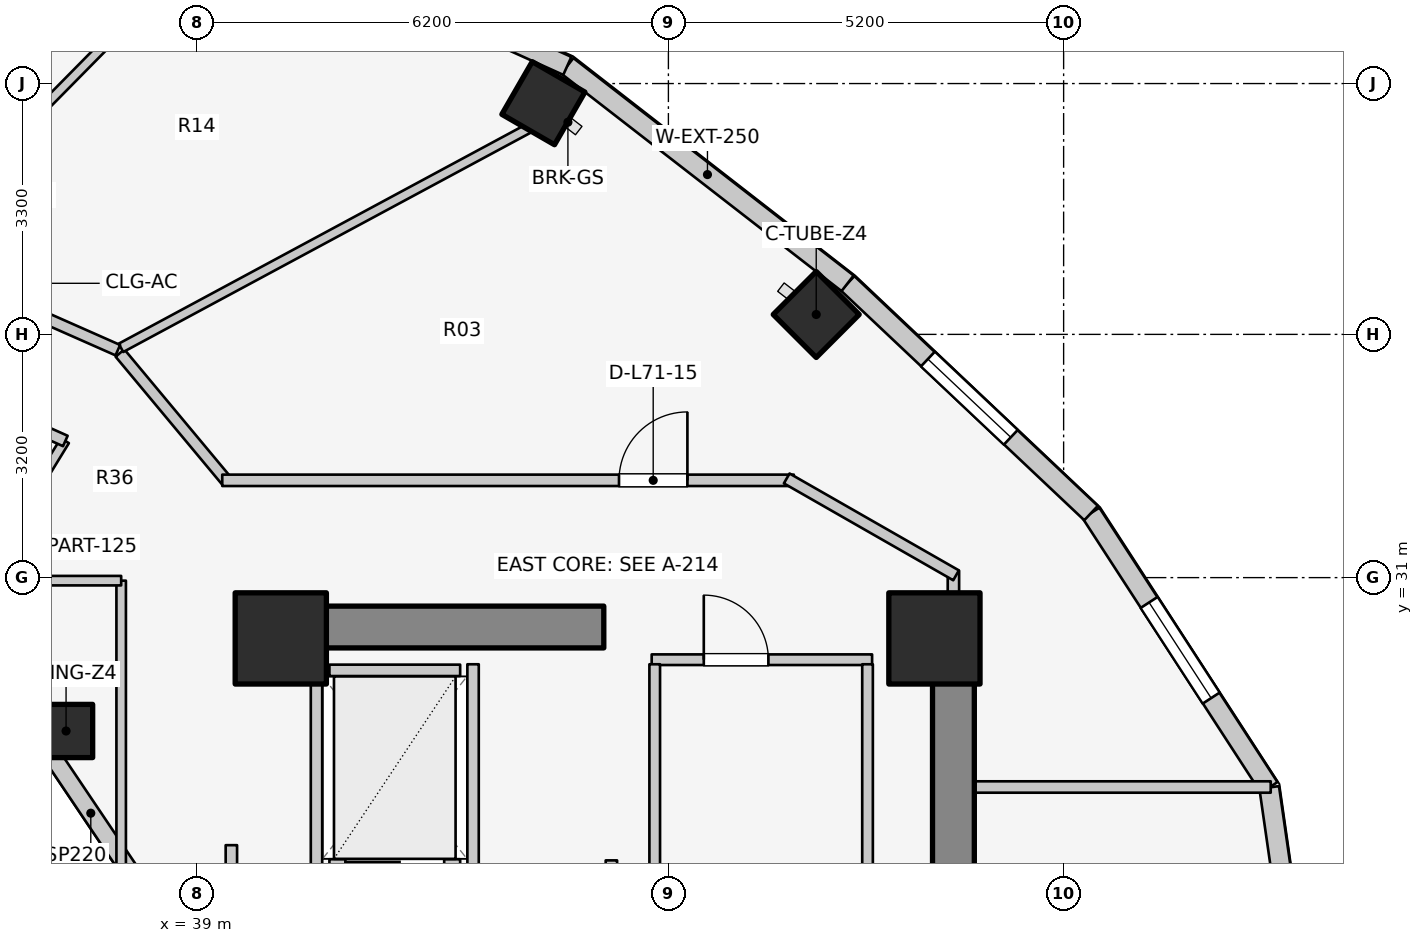
"""IFC4 building model, lengths in metres.
Left out: names, types, materials, properties, quantities, classifications, styles, units other than length and angle.
Written with IfcOpenShell. Run it as: python <this file> out.ifc"""

import sys

from ifc_helpers import new_model, si_unit, direction, frame, frame_2d, origin, origin_2d, place, context, subcontext, project, spatial, rectangle, extrude, element, fill, save


model = new_model("IFC4")
c1 = context("Model", 3, precision=1e-05, world=origin(), true_north=direction((0.0, 1.0)))
c2 = subcontext(c1, "Body", "Model", "MODEL_VIEW")
j1 = project(units=[si_unit("LENGTHUNIT", "METRE"), si_unit("PLANEANGLEUNIT", "RADIAN")], contexts=[c1])
p1 = place(None, origin())
s1 = spatial("IfcSite", under=j1, at=p1, CompositionType="ELEMENT")
p2 = place(p1, origin())
s2 = spatial("IfcBuilding", under=s1, at=p2, CompositionType="ELEMENT")
p3 = place(p2, frame((0.0, 0.0, 232.6)))
s3 = spatial("IfcBuildingStorey", under=s2, at=p3, CompositionType="ELEMENT", Elevation=232.6)
p4 = place(p3, frame((48.95, 17.05, 0.0), z_axis=(0.0, 0.0, 1.0), x_axis=(0.0, 1.0, 0.0)))
e1 = element("IfcWall", 1, at=p4, inside=s3, PredefinedType="SHEAR", context=c2, shape_type="SweptSolid", body=[
    extrude(rectangle(XDim=12.8, YDim=0.55, at=frame_2d((6.4, 0.0))), origin(), (0.0, 0.0, 1.0), 3.1),
])
p5 = place(p3, frame((39.85, 30.35, 0.0), z_axis=(0.0, 0.0, 1.0), x_axis=(1.0, 0.0, 0.0)))
e2 = element("IfcWall", 2, at=p5, inside=s3, PredefinedType="SHEAR", context=c2, shape_type="SweptSolid", body=[
    extrude(rectangle(XDim=4.5, YDim=0.55, at=frame_2d((2.25, 0.0))), origin(), (0.0, 0.0, 1.0), 3.1),
])
for number, where, z_axis, x_axis in (
    (3, (48.7, 30.2, 0.0), (0.0, 0.0, 1.0), (1.0, 0.0, 0.0)),
    (4, (40.1, 30.2, 0.0), (0.0, 0.0, 1.0), (1.0, 0.0, 0.0)),
):
    element("IfcColumn", number, at=place(p3, frame(where, z_axis=z_axis, x_axis=x_axis)), inside=s3, PredefinedType="COLUMN", context=c2, shape_type="SweptSolid", body=[
        extrude(rectangle(XDim=1.2, YDim=1.2, at=origin_2d()), origin(), (0.0, 0.0, 1.0), 3.1),
    ])
p6 = place(p3, frame((37.275, 28.982, 0.0), z_axis=(0.0, 0.0, 1.0), x_axis=(1.0, 0.0, 0.0)))
e5 = element("IfcColumn", 5, at=p6, inside=s3, PredefinedType="COLUMN", context=c2, shape_type="SweptSolid", body=[
    extrude(rectangle(XDim=0.7, YDim=0.7, at=origin_2d()), origin(), (0.0, 0.0, 1.0), 3.1),
])
for number, where, z_axis, x_axis in (
    (6, (47.145, 34.462, 0.0), (0.0, 0.0, 1.0), (0.707, 0.707, 0.0)),
    (7, (43.555, 37.241, 0.0), (0.0, 0.0, 1.0), (0.5, 0.866, 0.0)),
):
    element("IfcColumn", number, at=place(p3, frame(where, z_axis=z_axis, x_axis=x_axis)), inside=s3, PredefinedType="COLUMN", context=c2, shape_type="SweptSolid", body=[
        extrude(rectangle(XDim=0.8, YDim=0.8, at=origin_2d()), origin(), (0.0, 0.0, 1.0), 3.1),
    ])
p7 = place(p3, frame((38.166, 27.06, 0.0), z_axis=(0.0, 0.0, 1.0), x_axis=(-0.558197800898, 0.829707909492, 0.0)))
e8 = element("IfcWall", 8, at=p7, inside=s3, PredefinedType="STANDARD", context=c2, shape_type="SweptSolid", body=[
    extrude(rectangle(XDim=2.027, YDim=0.23, at=frame_2d((1.013, 0.0))), origin(), (0.0, 0.0, 1.0), 2.16),
])
p8 = place(p3, frame((37.035, 28.742, 0.0), z_axis=(0.0, 0.0, 1.0), x_axis=(-0.752576694707, 0.658504607869, 0.0)))
e9 = element("IfcWall", 9, at=p8, inside=s3, PredefinedType="STANDARD", context=c2, shape_type="SweptSolid", body=[
    extrude(rectangle(XDim=1.959, YDim=0.23, at=frame_2d((0.98, 0.0))), origin(), (0.0, 0.0, 1.0), 2.16),
])
p9 = place(p3, frame((53.86, 23.0, 0.0), z_axis=(0.0, 0.0, 1.0), x_axis=(-0.142712754019, 0.989764148593, 0.0)))
e10 = element("IfcWall", 10, at=p9, inside=s3, PredefinedType="STANDARD", context=c2, shape_type="SweptSolid", body=[
    extrude(rectangle(XDim=5.293, YDim=0.26, at=frame_2d((2.646, 0.0))), origin(), (0.0, 0.0, 1.0), 2.85),
])
p10 = place(p9, frame((1.896, 0.0, 0.75)))
e11 = element("IfcOpeningElement", 11, at=p10, cuts=e10, PredefinedType="OPENING", context=c2, shape_type="SweptSolid", body=[
    extrude(rectangle(XDim=1.5, YDim=1.6, at=frame_2d((0.75, 0.8))), frame((0.0, 0.14, 0.0), z_axis=(0.0, -1.0, 0.0), x_axis=(1.0, 0.0, 0.0)), (0.0, 0.0, 1.0), 0.28),
])
p11 = place(p3, frame((53.105, 28.239, 0.0), z_axis=(0.0, 0.0, 1.0), x_axis=(-0.544475908819, 0.838776480784, 0.0)))
e12 = element("IfcWall", 12, at=p11, inside=s3, PredefinedType="STANDARD", context=c2, shape_type="SweptSolid", body=[
    extrude(rectangle(XDim=4.305, YDim=0.26, at=frame_2d((2.152, 0.0))), origin(), (0.0, 0.0, 1.0), 2.85),
])
p12 = place(p11, frame((1.402, 0.0, 0.75)))
e13 = element("IfcOpeningElement", 13, at=p12, cuts=e12, PredefinedType="OPENING", context=c2, shape_type="SweptSolid", body=[
    extrude(rectangle(XDim=1.5, YDim=1.6, at=frame_2d((0.75, 0.8))), frame((0.0, 0.14, 0.0), z_axis=(0.0, -1.0, 0.0), x_axis=(1.0, 0.0, 0.0)), (0.0, 0.0, 1.0), 0.28),
])
p13 = place(p3, frame((50.761, 31.849, 0.0), z_axis=(0.0, 0.0, 1.0), x_axis=(-0.72731899451, 0.686299555752, 0.0)))
e14 = element("IfcWall", 14, at=p13, inside=s3, PredefinedType="STANDARD", context=c2, shape_type="SweptSolid", body=[
    extrude(rectangle(XDim=4.404, YDim=0.26, at=frame_2d((2.202, 0.0))), origin(), (0.0, 0.0, 1.0), 2.85),
])
p14 = place(p13, frame((1.452, 0.0, 0.75)))
e15 = element("IfcOpeningElement", 15, at=p14, cuts=e14, PredefinedType="OPENING", context=c2, shape_type="SweptSolid", body=[
    extrude(rectangle(XDim=1.5, YDim=1.6, at=frame_2d((0.75, 0.8))), frame((0.0, 0.14, 0.0), z_axis=(0.0, -1.0, 0.0), x_axis=(1.0, 0.0, 0.0)), (0.0, 0.0, 1.0), 0.28),
])
p15 = place(p3, frame((47.558, 34.872, 0.0), z_axis=(0.0, 0.0, 1.0), x_axis=(-0.790126214723, 0.612944177563, 0.0)))
e16 = element("IfcWall", 16, at=p15, inside=s3, PredefinedType="STANDARD", context=c2, shape_type="SweptSolid", body=[
    extrude(rectangle(XDim=4.667, YDim=0.26, at=frame_2d((2.333, 0.0))), origin(), (0.0, 0.0, 1.0), 2.85),
])
p16 = place(p3, frame((43.87, 37.733, 0.0), z_axis=(0.0, 0.0, 1.0), x_axis=(-0.911427484938, 0.411460738952, 0.0)))
e17 = element("IfcWall", 17, at=p16, inside=s3, PredefinedType="STANDARD", context=c2, shape_type="SweptSolid", body=[
    extrude(rectangle(XDim=5.296, YDim=0.26, at=frame_2d((2.648, 0.0))), origin(), (0.0, 0.0, 1.0), 2.85),
])
p17 = place(p16, frame((1.448, 0.0, 0.75)))
e18 = element("IfcOpeningElement", 18, at=p17, cuts=e17, PredefinedType="OPENING", context=c2, shape_type="SweptSolid", body=[
    extrude(rectangle(XDim=2.4, YDim=1.7, at=frame_2d((1.2, 0.85))), frame((0.0, 0.14, 0.0), z_axis=(0.0, -1.0, 0.0), x_axis=(1.0, 0.0, 0.0)), (0.0, 0.0, 1.0), 0.28),
])
p18 = place(p3, frame((40.74, 27.22, 0.0), z_axis=(0.0, 0.0, 1.0), x_axis=(1.0, 0.0, 0.0)))
e19 = element("IfcWall", 19, at=p18, inside=s3, PredefinedType="SOLIDWALL", context=c2, shape_type="SweptSolid", body=[
    extrude(rectangle(XDim=1.72, YDim=0.15, at=frame_2d((0.86, 0.0))), origin(), (0.0, 0.0, 1.0), 2.855),
])
p19 = place(p18, frame((0.21, 0.0, 0.0)))
e20 = element("IfcOpeningElement", 20, at=p19, cuts=e19, PredefinedType="OPENING", context=c2, shape_type="SweptSolid", body=[
    extrude(rectangle(XDim=1.3, YDim=2.1, at=frame_2d((0.65, 1.05))), frame((0.0, 0.085, 0.0), z_axis=(0.0, -1.0, 0.0), x_axis=(1.0, 0.0, 0.0)), (0.0, 0.0, 1.0), 0.17),
])
p20 = place(p3, frame((40.74, 29.78, 0.0), z_axis=(0.0, 0.0, 1.0), x_axis=(1.0, 0.0, 0.0)))
e21 = element("IfcWall", 21, at=p20, inside=s3, PredefinedType="SOLIDWALL", context=c2, shape_type="SweptSolid", body=[
    extrude(rectangle(XDim=1.72, YDim=0.15, at=frame_2d((0.86, 0.0))), origin(), (0.0, 0.0, 1.0), 2.855),
])
for number, where, z_axis, x_axis in (
    (22, (40.57, 27.14, 0.0), (0.0, 0.0, 1.0), (0.0, 1.0, 0.0)),
    (23, (42.63, 27.14, 0.0), (0.0, 0.0, 1.0), (0.0, 1.0, 0.0)),
):
    element("IfcWall", number, at=place(p3, frame(where, z_axis=z_axis, x_axis=x_axis)), inside=s3, PredefinedType="SOLIDWALL", context=c2, shape_type="SweptSolid", body=[
        extrude(rectangle(XDim=2.72, YDim=0.15, at=frame_2d((1.36, 0.0))), origin(), (0.0, 0.0, 1.0), 2.855),
    ])
p21 = place(p3, frame((44.45, 24.08, 0.0), z_axis=(0.0, 0.0, 1.0), x_axis=(0.0, 1.0, 0.0)))
e24 = element("IfcWall", 24, at=p21, inside=s3, PredefinedType="PARTITIONING", context=c2, shape_type="SweptSolid", body=[
    extrude(rectangle(XDim=3.2, YDim=0.15, at=frame_2d((1.6, 0.0))), origin(), (0.0, 0.0, 1.0), 2.855),
])
p22 = place(p3, frame((39.45, 24.08, 0.0), z_axis=(0.0, 0.0, 1.0), x_axis=(0.0, 1.0, 0.0)))
e25 = element("IfcWall", 25, at=p22, inside=s3, PredefinedType="PARTITIONING", context=c2, shape_type="SweptSolid", body=[
    extrude(rectangle(XDim=3.4, YDim=0.15, at=frame_2d((1.7, 0.0))), origin(), (0.0, 0.0, 1.0), 2.855),
])
p23 = place(p22, frame((1.894, 0.0, 0.0)))
e26 = element("IfcOpeningElement", 26, at=p23, cuts=e25, PredefinedType="OPENING", context=c2, shape_type="SweptSolid", body=[
    extrude(rectangle(XDim=1.1, YDim=2.1, at=frame_2d((0.55, 1.05))), frame((0.0, 0.085, 0.0), z_axis=(0.0, -1.0, 0.0), x_axis=(1.0, 0.0, 0.0)), (0.0, 0.0, 1.0), 0.17),
])
p24 = place(p3, frame((44.98, 29.92, 0.0), z_axis=(0.0, 0.0, 1.0), x_axis=(1.0, 0.0, 0.0)))
e27 = element("IfcWall", 27, at=p24, inside=s3, PredefinedType="PLUMBINGWALL", context=c2, shape_type="SweptSolid", body=[
    extrude(rectangle(XDim=2.9, YDim=0.14, at=frame_2d((1.45, 0.0))), origin(), (0.0, 0.0, 1.0), 2.855),
])
p25 = place(p24, frame((0.686, 0.0, 0.0)))
e28 = element("IfcOpeningElement", 28, at=p25, cuts=e27, PredefinedType="OPENING", context=c2, shape_type="SweptSolid", body=[
    extrude(rectangle(XDim=0.85, YDim=2.05, at=frame_2d((0.425, 1.025))), frame((0.0, 0.08, 0.0), z_axis=(0.0, -1.0, 0.0), x_axis=(1.0, 0.0, 0.0)), (0.0, 0.0, 1.0), 0.16),
])
for number, where, z_axis, x_axis in (
    (29, (45.02, 25.98, 0.0), (0.0, 0.0, 1.0), (0.0, 1.0, 0.0)),
    (30, (47.82, 25.98, 0.0), (0.0, 0.0, 1.0), (0.0, 1.0, 0.0)),
):
    element("IfcWall", number, at=place(p3, frame(where, z_axis=z_axis, x_axis=x_axis)), inside=s3, PredefinedType="PLUMBINGWALL", context=c2, shape_type="SweptSolid", body=[
        extrude(rectangle(XDim=3.88, YDim=0.14, at=frame_2d((1.94, 0.0))), origin(), (0.0, 0.0, 1.0), 2.855),
    ])
p26 = place(p3, frame((35.55, 30.015, 0.0), z_axis=(0.0, 0.0, 1.0), x_axis=(0.522763432117, 0.852477796802, 0.0)))
e31 = element("IfcWall", 31, at=p26, inside=s3, PredefinedType="PARTITIONING", context=c2, shape_type="SweptSolid", body=[
    extrude(rectangle(XDim=3.269, YDim=0.125, at=frame_2d((1.635, 0.0))), origin(), (0.0, 0.0, 1.0), 2.376),
])
p27 = place(p3, frame((37.265, 32.798, 0.0), z_axis=(0.0, 0.0, 1.0), x_axis=(-0.913254317828, 0.407389924971, 0.0)))
e32 = element("IfcWall", 32, at=p27, inside=s3, PredefinedType="PARTITIONING", context=c2, shape_type="SweptSolid", body=[
    extrude(rectangle(XDim=2.787, YDim=0.15, at=frame_2d((1.393, 0.0))), origin(), (0.0, 0.0, 1.0), 2.376),
])
p28 = place(p3, frame((38.0, 25.8, 0.0), z_axis=(0.0, 0.0, 1.0), x_axis=(0.0, 1.0, 0.0)))
e33 = element("IfcWall", 33, at=p28, inside=s3, PredefinedType="PARTITIONING", context=c2, shape_type="SweptSolid", body=[
    extrude(rectangle(XDim=5.16, YDim=0.125, at=frame_2d((2.58, 0.0))), origin(), (0.0, 0.0, 1.0), 2.232),
])
p29 = place(p3, frame((35.4, 30.96, 0.0), z_axis=(0.0, 0.0, 1.0), x_axis=(1.0, 0.0, 0.0)))
e34 = element("IfcWall", 34, at=p29, inside=s3, PredefinedType="PARTITIONING", context=c2, shape_type="SweptSolid", body=[
    extrude(rectangle(XDim=2.6, YDim=0.125, at=frame_2d((1.3, 0.0))), origin(), (0.0, 0.0, 1.0), 2.376),
])
p30 = place(p3, frame((48.95, 28.245, 0.0), z_axis=(0.0, 0.0, 1.0), x_axis=(1.0, 0.0, 0.0)))
e35 = element("IfcWall", 35, at=p30, inside=s3, PredefinedType="PARTITIONING", context=c2, shape_type="SweptSolid", body=[
    extrude(rectangle(XDim=4.175, YDim=0.15, at=frame_2d((2.087, 0.0))), origin(), (0.0, 0.0, 1.0), 2.855),
])
p31 = place(p3, frame((48.95, 29.8, 0.0), z_axis=(0.0, 0.0, 1.0), x_axis=(0.0, 1.0, 0.0)))
e36 = element("IfcWall", 36, at=p31, inside=s3, PredefinedType="PARTITIONING", context=c2, shape_type="SweptSolid", body=[
    extrude(rectangle(XDim=1.29, YDim=0.15, at=frame_2d((0.645, 0.0))), origin(), (0.0, 0.0, 1.0), 2.855),
])
p32 = place(p3, frame((37.984, 33.955, 0.0), z_axis=(0.0, 0.0, 1.0), x_axis=(0.64030392053, -0.76812166312, 0.0)))
e37 = element("IfcWall", 37, at=p32, inside=s3, PredefinedType="PARTITIONING", context=c2, shape_type="SweptSolid", body=[
    extrude(rectangle(XDim=2.21, YDim=0.15, at=frame_2d((1.105, 0.0))), origin(), (0.0, 0.0, 1.0), 2.376),
])
p33 = place(p3, frame((39.33, 32.28, 0.0), z_axis=(0.0, 0.0, 1.0), x_axis=(1.0, 0.0, 0.0)))
e38 = element("IfcWall", 38, at=p33, inside=s3, PredefinedType="PARTITIONING", context=c2, shape_type="SweptSolid", body=[
    extrude(rectangle(XDim=7.52, YDim=0.15, at=frame_2d((3.76, 0.0))), origin(), (0.0, 0.0, 1.0), 2.376),
])
p34 = place(p33, frame((5.22, 0.0, 0.0)))
e39 = element("IfcOpeningElement", 39, at=p34, cuts=e38, PredefinedType="OPENING", context=c2, shape_type="SweptSolid", body=[
    extrude(rectangle(XDim=0.9, YDim=2.1, at=frame_2d((0.45, 1.05))), frame((0.0, 0.085, 0.0), z_axis=(0.0, -1.0, 0.0), x_axis=(1.0, 0.0, 0.0)), (0.0, 0.0, 1.0), 0.17),
])
p35 = place(p3, frame((46.757, 32.305, 0.0), z_axis=(0.0, 0.0, 1.0), x_axis=(0.867991349648, -0.496579315857, 0.0)))
e40 = element("IfcWall", 40, at=p35, inside=s3, PredefinedType="PARTITIONING", context=c2, shape_type="SweptSolid", body=[
    extrude(rectangle(XDim=2.567, YDim=0.15, at=frame_2d((1.283, 0.0))), origin(), (0.0, 0.0, 1.0), 2.22),
])
p36 = place(p3, frame((37.997, 34.023, 0.0), z_axis=(0.0, 0.0, 1.0), x_axis=(0.880531534665, 0.473987569943, 0.0)))
e41 = element("IfcWall", 41, at=p36, inside=s3, PredefinedType="PARTITIONING", context=c2, shape_type="SweptSolid", body=[
    extrude(rectangle(XDim=6.096, YDim=0.125, at=frame_2d((3.048, 0.0))), origin(), (0.0, 0.0, 1.0), 2.376),
])
p37 = place(p3, frame((35.118, 35.304, 0.0), z_axis=(0.0, 0.0, 1.0), x_axis=(0.702191571271, 0.711988059756, 0.0)))
e42 = element("IfcWall", 42, at=p37, inside=s3, PredefinedType="PARTITIONING", context=c2, shape_type="SweptSolid", body=[
    extrude(rectangle(XDim=5.184, YDim=0.125, at=frame_2d((2.592, 0.0))), origin(), (0.0, 0.0, 1.0), 2.376),
])
p38 = place(p3, frame((37.956, 33.992, 0.0), z_axis=(0.0, 0.0, 1.0), x_axis=(-0.914642679993, 0.404263240891, 0.0)))
e43 = element("IfcWall", 43, at=p38, inside=s3, PredefinedType="PARTITIONING", context=c2, shape_type="SweptSolid", body=[
    extrude(rectangle(XDim=3.154, YDim=0.15, at=frame_2d((1.577, 0.0))), origin(), (0.0, 0.0, 1.0), 2.376),
])
p39 = place(p38, frame((1.077, 0.0, 0.0)))
e44 = element("IfcOpeningElement", 44, at=p39, cuts=e43, PredefinedType="OPENING", context=c2, shape_type="SweptSolid", body=[
    extrude(rectangle(XDim=1.0, YDim=2.1, at=frame_2d((0.5, 1.05))), frame((0.0, 0.085, 0.0), z_axis=(0.0, -1.0, 0.0), x_axis=(1.0, 0.0, 0.0)), (0.0, 0.0, 1.0), 0.17),
])
p40 = place(p12, origin())
e45 = element("IfcWindow", 45, at=p40, inside=s3, PartitioningType="SINGLE_PANEL", PredefinedType="WINDOW", context=c2, shape_type="SweptSolid", body=[
    extrude(rectangle(XDim=1.5, YDim=1.6, at=frame_2d((0.75, 0.8))), frame((0.0, 0.03, 0.0), z_axis=(0.0, -1.0, 0.0), x_axis=(1.0, 0.0, 0.0)), (0.0, 0.0, 1.0), 0.06),
])
fill(e13, e45)
p41 = place(p14, origin())
e46 = element("IfcWindow", 46, at=p41, inside=s3, PartitioningType="SINGLE_PANEL", PredefinedType="WINDOW", context=c2, shape_type="SweptSolid", body=[
    extrude(rectangle(XDim=1.5, YDim=1.6, at=frame_2d((0.75, 0.8))), frame((0.0, 0.03, 0.0), z_axis=(0.0, -1.0, 0.0), x_axis=(1.0, 0.0, 0.0)), (0.0, 0.0, 1.0), 0.06),
])
fill(e15, e46)
p42 = place(p25, origin())
e47 = element("IfcDoor", 47, at=p42, inside=s3, OperationType="SINGLE_SWING_LEFT", PredefinedType="DOOR", context=c2, shape_type="SweptSolid", body=[
    extrude(rectangle(XDim=0.85, YDim=2.05, at=frame_2d((0.425, 1.025))), frame((0.0, 0.025, 0.0), z_axis=(0.0, -1.0, 0.0), x_axis=(1.0, 0.0, 0.0)), (0.0, 0.0, 1.0), 0.05),
])
fill(e28, e47)
p43 = place(p34, origin())
e48 = element("IfcDoor", 48, at=p43, inside=s3, OperationType="SINGLE_SWING_RIGHT", PredefinedType="DOOR", context=c2, shape_type="SweptSolid", body=[
    extrude(rectangle(XDim=0.9, YDim=2.1, at=frame_2d((0.45, 1.05))), frame((0.0, 0.025, 0.0), z_axis=(0.0, -1.0, 0.0), x_axis=(1.0, 0.0, 0.0)), (0.0, 0.0, 1.0), 0.05),
])
fill(e39, e48)
save(model, sys.argv[1])
